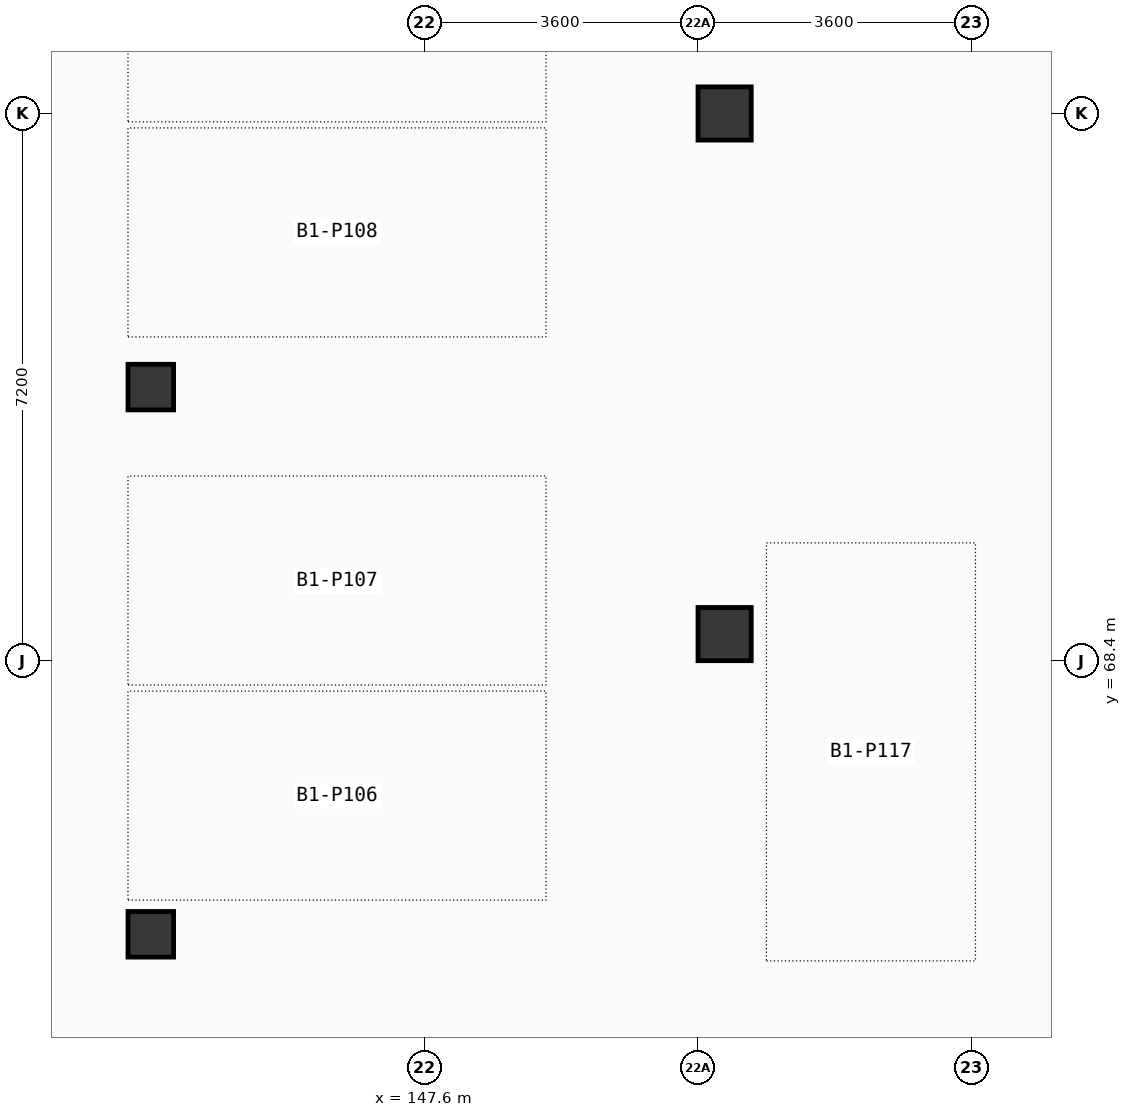
"""IFC4 building model, lengths in metres.
Left out: names, types, materials, properties, quantities, classifications, styles, units other than length and angle.
Written with IfcOpenShell. Run it as: python <this file> out.ifc"""

import sys

from ifc_helpers import new_model, si_unit, direction, frame, origin, origin_2d, place, context, subcontext, project, spatial, rectangle, extrude, element, save


model = new_model("IFC4")
c1 = context("Model", 3, precision=1e-05, world=origin(), true_north=direction((0.0, 1.0)))
c2 = subcontext(c1, "Body", "Model", "MODEL_VIEW")
j1 = project(units=[si_unit("LENGTHUNIT", "METRE"), si_unit("PLANEANGLEUNIT", "RADIAN")], contexts=[c1])
p1 = place(None, origin())
s1 = spatial("IfcSite", under=j1, at=p1, CompositionType="ELEMENT")
p2 = place(p1, origin())
s2 = spatial("IfcBuilding", under=s1, at=p2, CompositionType="ELEMENT")
p3 = place(p2, frame((0.0, 0.0, -4.2)))
s3 = spatial("IfcBuildingStorey", under=s2, at=p3, CompositionType="ELEMENT", Elevation=-4.2)
for number, where, z_axis, x_axis in (
    (1, (144.0, 64.8, 0.0), (0.0, 0.0, 1.0), (1.0, 0.0, 0.0)),
    (2, (144.0, 72.0, 0.0), (0.0, 0.0, 1.0), (1.0, 0.0, 0.0)),
):
    element("IfcColumn", number, at=place(p3, frame(where, z_axis=z_axis, x_axis=x_axis)), inside=s3, PredefinedType="COLUMN", context=c2, shape_type="SweptSolid", body=[
        extrude(rectangle(XDim=0.6, YDim=0.6, at=origin_2d()), origin(), (0.0, 0.0, 1.0), 4.2),
    ])
for number, where, z_axis, x_axis in (
    (3, (151.55, 68.75, 0.0), (0.0, 0.0, 1.0), (1.0, 0.0, 0.0)),
    (4, (151.55, 75.6, 0.0), (0.0, 0.0, 1.0), (1.0, 0.0, 0.0)),
):
    element("IfcColumn", number, at=place(p3, frame(where, z_axis=z_axis, x_axis=x_axis)), inside=s3, PredefinedType="COLUMN", context=c2, shape_type="SweptSolid", body=[
        extrude(rectangle(XDim=0.7, YDim=0.7, at=origin_2d()), origin(), (0.0, 0.0, 1.0), 4.2),
    ])
save(model, sys.argv[1])
